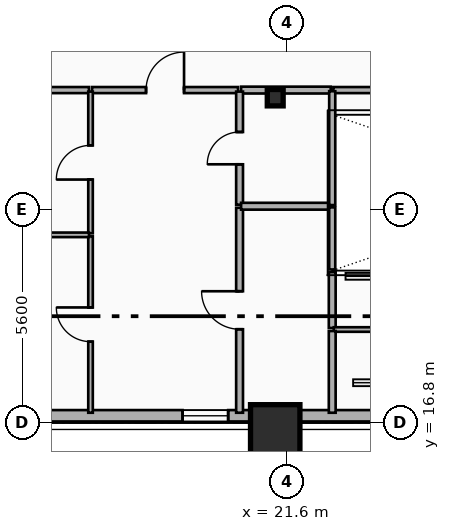
"""IFC4 building model, lengths in metres.
Left out: names, types, materials, properties, quantities, classifications, styles, units other than length and angle.
Written with IfcOpenShell. Run it as: python <this file> out.ifc"""

import sys

from ifc_helpers import new_model, si_unit, direction, frame, frame_2d, origin, origin_2d, place, context, subcontext, project, spatial, rectangle, i_section, extrude, element, fill, save


model = new_model("IFC4")
c1 = context("Model", 3, precision=1e-05, world=origin(), true_north=direction((0.0, 1.0)))
c2 = subcontext(c1, "Body", "Model", "MODEL_VIEW")
j1 = project(units=[si_unit("LENGTHUNIT", "METRE"), si_unit("PLANEANGLEUNIT", "RADIAN")], contexts=[c1])
p1 = place(None, origin())
s1 = spatial("IfcSite", under=j1, at=p1, CompositionType="ELEMENT")
p2 = place(p1, origin())
s2 = spatial("IfcBuilding", under=s1, at=p2, CompositionType="ELEMENT")
p3 = place(p2, frame((0.0, 0.0, 104.8)))
s3 = spatial("IfcBuildingStorey", under=s2, at=p3, CompositionType="ELEMENT", Elevation=104.8)
p4 = place(p3, frame((21.3, 25.35, 0.0), z_axis=(0.0, 0.0, 1.0), x_axis=(1.0, 0.0, 0.0)))
e1 = element("IfcColumn", 1, at=p4, inside=s3, PredefinedType="COLUMN", context=c2, shape_type="SweptSolid", body=[
    extrude(i_section(OverallWidth=0.418, OverallDepth=0.432, WebThickness=0.035, FlangeThickness=0.056, FilletRadius=0.015, at=origin_2d()), origin(), (0.0, 0.0, 1.0), 3.5),
])
p5 = place(p3, frame((21.3, 16.731, 0.0), z_axis=(0.0, -0.090241349316, 0.995919925935), x_axis=(1.0, 0.0, 0.0)))
e2 = element("IfcColumn", 2, at=p5, inside=s3, PredefinedType="COLUMN", context=c2, shape_type="SweptSolid", body=[
    extrude(rectangle(XDim=1.3, YDim=1.3, at=origin_2d()), origin(), (0.0, 0.0, 1.0), 3.514),
])
p6 = place(p3, frame((53.4, 16.98, 0.0), z_axis=(0.0, 0.0, 1.0), x_axis=(-1.0, 0.0, 0.0)))
e3 = element("IfcWall", 3, at=p6, inside=s3, PredefinedType="SOLIDWALL", context=c2, shape_type="SweptSolid", body=[
    extrude(rectangle(XDim=49.2, YDim=0.3, at=frame_2d((24.6, 0.0))), origin(), (0.0, 0.0, 1.0), 3.24),
])
p7 = place(p6, frame((44.256, 0.0, 0.75)))
e4 = element("IfcOpeningElement", 4, at=p7, cuts=e3, PredefinedType="OPENING", context=c2, shape_type="SweptSolid", body=[
    extrude(rectangle(XDim=1.4, YDim=1.8, at=frame_2d((0.7, 0.9))), frame((0.0, 0.16, 0.0), z_axis=(0.0, -1.0, 0.0), x_axis=(1.0, 0.0, 0.0)), (0.0, 0.0, 1.0), 0.32),
])
p8 = place(p6, frame((42.33, 0.0, 0.68)))
e5 = element("IfcOpeningElement", 5, at=p8, cuts=e3, PredefinedType="OPENING", context=c2, shape_type="SweptSolid", body=[
    extrude(rectangle(XDim=1.2, YDim=1.5, at=frame_2d((0.6, 0.75))), frame((0.0, 0.16, 0.0), z_axis=(0.0, -1.0, 0.0), x_axis=(1.0, 0.0, 0.0)), (0.0, 0.0, 1.0), 0.32),
])
p9 = place(p6, frame((33.338, 0.0, 0.34)))
e6 = element("IfcOpeningElement", 6, at=p9, cuts=e3, PredefinedType="OPENING", context=c2, shape_type="SweptSolid", body=[
    extrude(rectangle(XDim=1.2, YDim=1.5, at=frame_2d((0.6, 0.75))), frame((0.0, 0.16, 0.0), z_axis=(0.0, -1.0, 0.0), x_axis=(1.0, 0.0, 0.0)), (0.0, 0.0, 1.0), 0.32),
])
p10 = place(p6, frame((39.04, 0.0, 1.22)))
e7 = element("IfcOpeningElement", 7, at=p10, cuts=e3, PredefinedType="OPENING", context=c2, shape_type="SweptSolid", body=[
    extrude(rectangle(XDim=1.1, YDim=1.05, at=frame_2d((0.55, 0.525))), frame((0.0, 0.16, 0.0), z_axis=(0.0, -1.0, 0.0), x_axis=(1.0, 0.0, 0.0)), (0.0, 0.0, 1.0), 0.32),
])
p11 = place(p6, frame((20.025, 0.0, 0.65)))
e8 = element("IfcOpeningElement", 8, at=p11, cuts=e3, PredefinedType="OPENING", context=c2, shape_type="SweptSolid", body=[
    extrude(rectangle(XDim=1.6, YDim=1.95, at=frame_2d((0.8, 0.975))), frame((0.0, 0.16, 0.0), z_axis=(0.0, -1.0, 0.0), x_axis=(1.0, 0.0, 0.0)), (0.0, 0.0, 1.0), 0.32),
])
p12 = place(p6, frame((9.06, 0.0, 0.48)))
e9 = element("IfcOpeningElement", 9, at=p12, cuts=e3, PredefinedType="OPENING", context=c2, shape_type="SweptSolid", body=[
    extrude(rectangle(XDim=1.2, YDim=1.5, at=frame_2d((0.6, 0.75))), frame((0.0, 0.16, 0.0), z_axis=(0.0, -1.0, 0.0), x_axis=(1.0, 0.0, 0.0)), (0.0, 0.0, 1.0), 0.32),
])
p13 = place(p6, frame((13.65, 0.0, 1.68)))
e10 = element("IfcOpeningElement", 10, at=p13, cuts=e3, PredefinedType="OPENING", context=c2, shape_type="SweptSolid", body=[
    extrude(rectangle(XDim=1.1, YDim=1.05, at=frame_2d((0.55, 0.525))), frame((0.0, 0.16, 0.0), z_axis=(0.0, -1.0, 0.0), x_axis=(1.0, 0.0, 0.0)), (0.0, 0.0, 1.0), 0.32),
])
p14 = place(p6, frame((3.544, 0.0, 0.75)))
e11 = element("IfcOpeningElement", 11, at=p14, cuts=e3, PredefinedType="OPENING", context=c2, shape_type="SweptSolid", body=[
    extrude(rectangle(XDim=1.4, YDim=1.8, at=frame_2d((0.7, 0.9))), frame((0.0, 0.16, 0.0), z_axis=(0.0, -1.0, 0.0), x_axis=(1.0, 0.0, 0.0)), (0.0, 0.0, 1.0), 0.32),
])
p15 = place(p6, frame((5.67, 0.0, 0.68)))
e12 = element("IfcOpeningElement", 12, at=p15, cuts=e3, PredefinedType="OPENING", context=c2, shape_type="SweptSolid", body=[
    extrude(rectangle(XDim=1.2, YDim=1.5, at=frame_2d((0.6, 0.75))), frame((0.0, 0.16, 0.0), z_axis=(0.0, -1.0, 0.0), x_axis=(1.0, 0.0, 0.0)), (0.0, 0.0, 1.0), 0.32),
])
p16 = place(p3, frame((16.48, 25.55, 0.0), z_axis=(0.0, 0.0, 1.0), x_axis=(1.0, 0.0, 0.0)))
e13 = element("IfcWall", 13, at=p16, inside=s3, PredefinedType="PARTITIONING", context=c2, shape_type="SweptSolid", body=[
    extrude(rectangle(XDim=3.842, YDim=0.16, at=frame_2d((1.921, 0.0))), origin(), (0.0, 0.0, 1.0), 3.24),
])
p17 = place(p16, frame((1.421, 0.0, 0.0)))
e14 = element("IfcOpeningElement", 14, at=p17, cuts=e13, PredefinedType="OPENING", context=c2, shape_type="SweptSolid", body=[
    extrude(rectangle(XDim=1.0, YDim=2.15, at=frame_2d((0.5, 1.075))), frame((0.0, 0.09, 0.0), z_axis=(0.0, -1.0, 0.0), x_axis=(1.0, 0.0, 0.0)), (0.0, 0.0, 1.0), 0.18),
])
p18 = place(p3, frame((20.402, 25.55, 0.0), z_axis=(0.0, 0.0, 1.0), x_axis=(1.0, 0.0, 0.0)))
e15 = element("IfcWall", 15, at=p18, inside=s3, PredefinedType="PLUMBINGWALL", context=c2, shape_type="SweptSolid", body=[
    extrude(rectangle(XDim=2.358, YDim=0.18, at=frame_2d((1.179, 0.0))), origin(), (0.0, 0.0, 1.0), 2.31),
])
p19 = place(p3, frame((12.24, 25.55, 0.0), z_axis=(0.0, 0.0, 1.0), x_axis=(1.0, 0.0, 0.0)))
e16 = element("IfcWall", 16, at=p19, inside=s3, PredefinedType="PARTITIONING", context=c2, shape_type="SweptSolid", body=[
    extrude(rectangle(XDim=4.16, YDim=0.16, at=frame_2d((2.08, 0.0))), origin(), (0.0, 0.0, 1.0), 2.31),
])
p20 = place(p3, frame((22.8, 19.29, 0.0), z_axis=(0.0, 0.0, 1.0), x_axis=(0.0, 1.0, 0.0)))
e17 = element("IfcWall", 17, at=p20, inside=s3, PredefinedType="PLUMBINGWALL", context=c2, shape_type="SweptSolid", body=[
    extrude(rectangle(XDim=1.47, YDim=0.18, at=frame_2d((0.735, 0.0))), origin(), (0.0, 0.0, 1.0), 2.68),
])
p21 = place(p3, frame((22.84, 19.25, 0.0), z_axis=(0.0, 0.0, 1.0), x_axis=(1.0, 0.0, 0.0)))
e18 = element("IfcWall", 18, at=p21, inside=s3, PredefinedType="PARTITIONING", context=c2, shape_type="SweptSolid", body=[
    extrude(rectangle(XDim=13.47, YDim=0.12, at=frame_2d((6.735, 0.0))), origin(), (0.0, 0.0, 1.0), 2.31),
])
p22 = place(p21, frame((6.285, 0.0, 0.0)))
e19 = element("IfcOpeningElement", 19, at=p22, cuts=e18, PredefinedType="OPENING", context=c2, shape_type="SweptSolid", body=[
    extrude(rectangle(XDim=0.9, YDim=2.1, at=frame_2d((0.45, 1.05))), frame((0.0, 0.07, 0.0), z_axis=(0.0, -1.0, 0.0), x_axis=(1.0, 0.0, 0.0)), (0.0, 0.0, 1.0), 0.14),
])
p23 = place(p3, frame((20.362, 17.06, 0.0), z_axis=(0.0, 0.0, 1.0), x_axis=(0.0, 1.0, 0.0)))
e20 = element("IfcWall", 20, at=p23, inside=s3, PredefinedType="PLUMBINGWALL", context=c2, shape_type="SweptSolid", body=[
    extrude(rectangle(XDim=5.394, YDim=0.18, at=frame_2d((2.697, 0.0))), origin(), (0.0, 0.0, 1.0), 2.78),
])
p24 = place(p23, frame((2.197, 0.0, 0.0)))
e21 = element("IfcOpeningElement", 21, at=p24, cuts=e20, PredefinedType="OPENING", context=c2, shape_type="SweptSolid", body=[
    extrude(rectangle(XDim=1.0, YDim=2.15, at=frame_2d((0.5, 1.075))), frame((0.0, 0.1, 0.0), z_axis=(0.0, -1.0, 0.0), x_axis=(1.0, 0.0, 0.0)), (0.0, 0.0, 1.0), 0.2),
])
p25 = place(p3, frame((20.362, 22.534, 0.0), z_axis=(0.0, 0.0, 1.0), x_axis=(0.0, 1.0, 0.0)))
e22 = element("IfcWall", 22, at=p25, inside=s3, PredefinedType="PLUMBINGWALL", context=c2, shape_type="SweptSolid", body=[
    extrude(rectangle(XDim=2.976, YDim=0.18, at=frame_2d((1.488, 0.0))), origin(), (0.0, 0.0, 1.0), 2.91),
])
p26 = place(p25, frame((1.063, 0.0, 0.0)))
e23 = element("IfcOpeningElement", 23, at=p26, cuts=e22, PredefinedType="OPENING", context=c2, shape_type="SweptSolid", body=[
    extrude(rectangle(XDim=0.85, YDim=2.1, at=frame_2d((0.425, 1.05))), frame((0.0, 0.1, 0.0), z_axis=(0.0, -1.0, 0.0), x_axis=(1.0, 0.0, 0.0)), (0.0, 0.0, 1.0), 0.2),
])
p27 = place(p3, frame((16.44, 17.06, 0.0), z_axis=(0.0, 0.0, 1.0), x_axis=(0.0, 1.0, 0.0)))
e24 = element("IfcWall", 24, at=p27, inside=s3, PredefinedType="PARTITIONING", context=c2, shape_type="SweptSolid", body=[
    extrude(rectangle(XDim=4.641, YDim=0.12, at=frame_2d((2.32, 0.0))), origin(), (0.0, 0.0, 1.0), 2.78),
])
p28 = place(p27, frame((1.871, 0.0, 0.0)))
e25 = element("IfcOpeningElement", 25, at=p28, cuts=e24, PredefinedType="OPENING", context=c2, shape_type="SweptSolid", body=[
    extrude(rectangle(XDim=0.9, YDim=2.1, at=frame_2d((0.45, 1.05))), frame((0.0, 0.07, 0.0), z_axis=(0.0, -1.0, 0.0), x_axis=(1.0, 0.0, 0.0)), (0.0, 0.0, 1.0), 0.14),
])
p29 = place(p3, frame((16.44, 21.781, 0.0), z_axis=(0.0, 0.0, 1.0), x_axis=(0.0, 1.0, 0.0)))
e26 = element("IfcWall", 26, at=p29, inside=s3, PredefinedType="PARTITIONING", context=c2, shape_type="SweptSolid", body=[
    extrude(rectangle(XDim=3.729, YDim=0.12, at=frame_2d((1.865, 0.0))), origin(), (0.0, 0.0, 1.0), 2.91),
])
p30 = place(p29, frame((1.415, 0.0, 0.0)))
e27 = element("IfcOpeningElement", 27, at=p30, cuts=e26, PredefinedType="OPENING", context=c2, shape_type="SweptSolid", body=[
    extrude(rectangle(XDim=0.9, YDim=2.1, at=frame_2d((0.45, 1.05))), frame((0.0, 0.07, 0.0), z_axis=(0.0, -1.0, 0.0), x_axis=(1.0, 0.0, 0.0)), (0.0, 0.0, 1.0), 0.14),
])
p31 = place(p3, frame((20.402, 22.494, 0.0), z_axis=(0.0, 0.0, 1.0), x_axis=(1.0, 0.0, 0.0)))
e28 = element("IfcWall", 28, at=p31, inside=s3, PredefinedType="PLUMBINGWALL", context=c2, shape_type="SweptSolid", body=[
    extrude(rectangle(XDim=2.358, YDim=0.18, at=frame_2d((1.179, 0.0))), origin(), (0.0, 0.0, 1.0), 2.31),
])
p32 = place(p3, frame((22.8, 17.06, 0.0), z_axis=(0.0, 0.0, 1.0), x_axis=(0.0, 1.0, 0.0)))
e29 = element("IfcWall", 29, at=p32, inside=s3, PredefinedType="PLUMBINGWALL", context=c2, shape_type="SweptSolid", body=[
    extrude(rectangle(XDim=2.15, YDim=0.18, at=frame_2d((1.075, 0.0))), origin(), (0.0, 0.0, 1.0), 3.24),
])
p33 = place(p3, frame((12.24, 21.741, 0.0), z_axis=(0.0, 0.0, 1.0), x_axis=(1.0, 0.0, 0.0)))
e30 = element("IfcWall", 30, at=p33, inside=s3, PredefinedType="PARTITIONING", context=c2, shape_type="SweptSolid", body=[
    extrude(rectangle(XDim=4.16, YDim=0.12, at=frame_2d((2.08, 0.0))), origin(), (0.0, 0.0, 1.0), 2.31),
])
p34 = place(p3, frame((22.83, 25.55, 0.0), z_axis=(0.0, 0.0, 1.0), x_axis=(1.0, 0.0, 0.0)))
e31 = element("IfcWall", 31, at=p34, inside=s3, PredefinedType="PARTITIONING", context=c2, shape_type="SweptSolid", body=[
    extrude(rectangle(XDim=13.49, YDim=0.16, at=frame_2d((6.745, 0.0))), origin(), (0.0, 0.0, 1.0), 2.31),
])
p35 = place(p3, frame((22.8, 20.83, 0.0), z_axis=(0.0, 0.0, 1.0), x_axis=(0.0, 1.0, 0.0)))
e32 = element("IfcWall", 32, at=p35, inside=s3, PredefinedType="PARTITIONING", context=c2, shape_type="SweptSolid", body=[
    extrude(rectangle(XDim=1.634, YDim=0.16, at=frame_2d((0.817, 0.0))), origin(), (0.0, 0.0, 1.0), 2.68),
])
p36 = place(p3, frame((22.8, 22.524, 0.0), z_axis=(0.0, 0.0, 1.0), x_axis=(0.0, 1.0, 0.0)))
e33 = element("IfcWall", 33, at=p36, inside=s3, PredefinedType="PARTITIONING", context=c2, shape_type="SweptSolid", body=[
    extrude(rectangle(XDim=2.996, YDim=0.16, at=frame_2d((1.498, 0.0))), origin(), (0.0, 0.0, 1.0), 3.24),
])
p37 = place(p9, origin())
e34 = element("IfcWindow", 34, at=p37, inside=s3, PartitioningType="SINGLE_PANEL", PredefinedType="WINDOW", context=c2, shape_type="SweptSolid", body=[
    extrude(rectangle(XDim=1.2, YDim=1.5, at=frame_2d((0.6, 0.75))), frame((0.0, 0.03, 0.0), z_axis=(0.0, -1.0, 0.0), x_axis=(1.0, 0.0, 0.0)), (0.0, 0.0, 1.0), 0.06),
])
fill(e6, e34)
p38 = place(p17, origin())
e35 = element("IfcDoor", 35, at=p38, inside=s3, OperationType="SINGLE_SWING_RIGHT", PredefinedType="DOOR", context=c2, shape_type="SweptSolid", body=[
    extrude(rectangle(XDim=1.0, YDim=2.15, at=frame_2d((0.5, 1.075))), frame((0.0, 0.025, 0.0), z_axis=(0.0, -1.0, 0.0), x_axis=(1.0, 0.0, 0.0)), (0.0, 0.0, 1.0), 0.05),
])
fill(e14, e35)
p39 = place(p24, origin())
e36 = element("IfcDoor", 36, at=p39, inside=s3, OperationType="SINGLE_SWING_RIGHT", PredefinedType="DOOR", context=c2, shape_type="SweptSolid", body=[
    extrude(rectangle(XDim=1.0, YDim=2.15, at=frame_2d((0.5, 1.075))), frame((0.0, 0.025, 0.0), z_axis=(0.0, -1.0, 0.0), x_axis=(1.0, 0.0, 0.0)), (0.0, 0.0, 1.0), 0.05),
])
fill(e21, e36)
p40 = place(p26, origin())
e37 = element("IfcDoor", 37, at=p40, inside=s3, OperationType="SINGLE_SWING_LEFT", PredefinedType="DOOR", context=c2, shape_type="SweptSolid", body=[
    extrude(rectangle(XDim=0.85, YDim=2.1, at=frame_2d((0.425, 1.05))), frame((0.0, 0.025, 0.0), z_axis=(0.0, -1.0, 0.0), x_axis=(1.0, 0.0, 0.0)), (0.0, 0.0, 1.0), 0.05),
])
fill(e23, e37)
p41 = place(p28, origin())
e38 = element("IfcDoor", 38, at=p41, inside=s3, OperationType="SINGLE_SWING_RIGHT", PredefinedType="DOOR", context=c2, shape_type="SweptSolid", body=[
    extrude(rectangle(XDim=0.9, YDim=2.1, at=frame_2d((0.45, 1.05))), frame((0.0, 0.025, 0.0), z_axis=(0.0, -1.0, 0.0), x_axis=(1.0, 0.0, 0.0)), (0.0, 0.0, 1.0), 0.05),
])
fill(e25, e38)
p42 = place(p30, origin())
e39 = element("IfcDoor", 39, at=p42, inside=s3, OperationType="SINGLE_SWING_LEFT", PredefinedType="DOOR", context=c2, shape_type="SweptSolid", body=[
    extrude(rectangle(XDim=0.9, YDim=2.1, at=frame_2d((0.45, 1.05))), frame((0.0, 0.025, 0.0), z_axis=(0.0, -1.0, 0.0), x_axis=(1.0, 0.0, 0.0)), (0.0, 0.0, 1.0), 0.05),
])
fill(e27, e39)
save(model, sys.argv[1])
